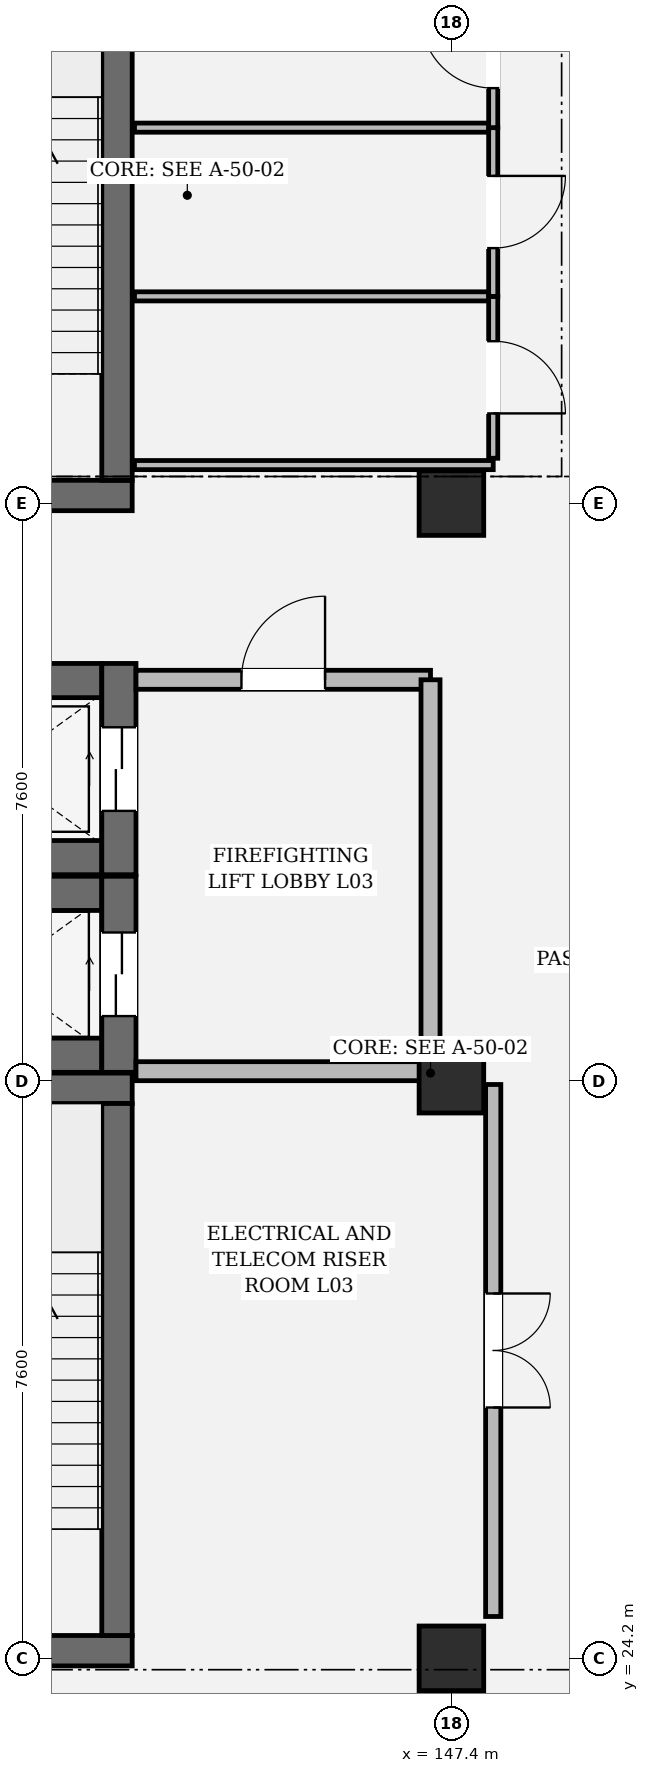
"""IFC4 building model, lengths in metres.
Left out: names, types, materials, properties, quantities, classifications, styles, units other than length and angle.
Written with IfcOpenShell. Run it as: python <this file> out.ifc"""

import sys

from ifc_helpers import new_model, si_unit, direction, frame, frame_2d, origin, origin_2d, place, context, subcontext, project, spatial, rectangle, extrude, element, fill, save


model = new_model("IFC4")
c1 = context("Model", 3, precision=1e-05, world=origin(), true_north=direction((0.0, 1.0)))
c2 = subcontext(c1, "Body", "Model", "MODEL_VIEW")
j1 = project(units=[si_unit("LENGTHUNIT", "METRE"), si_unit("PLANEANGLEUNIT", "RADIAN")], contexts=[c1])
p1 = place(None, origin())
s1 = spatial("IfcSite", under=j1, at=p1, CompositionType="ELEMENT")
p2 = place(p1, origin())
s2 = spatial("IfcBuilding", under=s1, at=p2, CompositionType="ELEMENT")
p3 = place(p2, frame((0.0, 0.0, 15.0)))
s3 = spatial("IfcBuildingStorey", under=s2, at=p3, CompositionType="ELEMENT", Elevation=15.0)
for number, where, z_axis, x_axis in (
    (1, (147.4, 24.2, 0.0), (0.0, 0.0, 1.0), (1.0, 0.0, 0.0)),
    (2, (147.4, 31.8, 0.0), (0.0, 0.0, 1.0), (1.0, 0.0, 0.0)),
    (3, (147.4, 39.4, 0.0), (0.0, 0.0, 1.0), (1.0, 0.0, 0.0)),
):
    element("IfcColumn", number, at=place(p3, frame(where, z_axis=z_axis, x_axis=x_axis)), inside=s3, PredefinedType="COLUMN", context=c2, shape_type="SweptSolid", body=[
        extrude(rectangle(XDim=0.85, YDim=0.85, at=origin_2d()), origin(), (0.0, 0.0, 1.0), 4.48),
    ])
p4 = place(p3, frame((139.4, 24.3, 0.0), z_axis=(0.0, 0.0, 1.0), x_axis=(1.0, 0.0, 0.0)))
e4 = element("IfcWall", 4, at=p4, inside=s3, PredefinedType="SHEAR", context=c2, shape_type="SweptSolid", body=[
    extrude(rectangle(XDim=3.8, YDim=0.4, at=frame_2d((1.9, 0.0))), origin(), (0.0, 0.0, 1.0), 4.48),
])
p5 = place(p4, frame((1.3, 0.0, 0.0)))
e5 = element("IfcOpeningElement", 5, at=p5, cuts=e4, PredefinedType="OPENING", context=c2, shape_type="SweptSolid", body=[
    extrude(rectangle(XDim=1.2, YDim=2.2, at=frame_2d((0.6, 1.1))), frame((0.0, 0.212, 0.0), z_axis=(0.0, -1.0, 0.0), x_axis=(1.0, 0.0, 0.0)), (0.0, 0.0, 1.0), 0.424),
])
p6 = place(p3, frame((139.4, 31.7, 0.0), z_axis=(0.0, 0.0, 1.0), x_axis=(1.0, 0.0, 0.0)))
e6 = element("IfcWall", 6, at=p6, inside=s3, PredefinedType="SHEAR", context=c2, shape_type="SweptSolid", body=[
    extrude(rectangle(XDim=3.8, YDim=0.4, at=frame_2d((1.9, 0.0))), origin(), (0.0, 0.0, 1.0), 4.48),
])
p7 = place(p3, frame((143.0, 24.5, 0.0), z_axis=(0.0, 0.0, 1.0), x_axis=(0.0, 1.0, 0.0)))
e7 = element("IfcWall", 7, at=p7, inside=s3, PredefinedType="SHEAR", context=c2, shape_type="SweptSolid", body=[
    extrude(rectangle(XDim=7.0, YDim=0.4, at=frame_2d((3.5, 0.0))), origin(), (0.0, 0.0, 1.0), 4.48),
])
p8 = place(p3, frame((139.4, 39.5, 0.0), z_axis=(0.0, 0.0, 1.0), x_axis=(1.0, 0.0, 0.0)))
e8 = element("IfcWall", 8, at=p8, inside=s3, PredefinedType="SHEAR", context=c2, shape_type="SweptSolid", body=[
    extrude(rectangle(XDim=3.8, YDim=0.4, at=frame_2d((1.9, 0.0))), origin(), (0.0, 0.0, 1.0), 4.48),
])
p9 = place(p8, frame((1.3, 0.0, 0.0)))
e9 = element("IfcOpeningElement", 9, at=p9, cuts=e8, PredefinedType="OPENING", context=c2, shape_type="SweptSolid", body=[
    extrude(rectangle(XDim=1.2, YDim=2.2, at=frame_2d((0.6, 1.1))), frame((0.0, 0.212, 0.0), z_axis=(0.0, -1.0, 0.0), x_axis=(1.0, 0.0, 0.0)), (0.0, 0.0, 1.0), 0.424),
])
p10 = place(p3, frame((143.0, 39.7, 0.0), z_axis=(0.0, 0.0, 1.0), x_axis=(0.0, 1.0, 0.0)))
e10 = element("IfcWall", 10, at=p10, inside=s3, PredefinedType="SHEAR", context=c2, shape_type="SweptSolid", body=[
    extrude(rectangle(XDim=7.0, YDim=0.4, at=frame_2d((3.5, 0.0))), origin(), (0.0, 0.0, 1.0), 4.48),
])
for number, where, z_axis, x_axis in (
    (11, (140.06, 32.135, 0.0), (0.0, 0.0, 1.0), (1.0, 0.0, 0.0)),
    (12, (140.06, 34.265, 0.0), (0.0, 0.0, 1.0), (1.0, 0.0, 0.0)),
):
    element("IfcWall", number, at=place(p3, frame(where, z_axis=z_axis, x_axis=x_axis)), inside=s3, PredefinedType="SHEAR", context=c2, shape_type="SweptSolid", body=[
        extrude(rectangle(XDim=2.74, YDim=0.45, at=frame_2d((1.37, 0.0))), origin(), (0.0, 0.0, 1.0), 4.48),
    ])
p11 = place(p3, frame((143.025, 31.91, 0.0), z_axis=(0.0, 0.0, 1.0), x_axis=(0.0, 1.0, 0.0)))
e13 = element("IfcWall", 13, at=p11, inside=s3, PredefinedType="SHEAR", context=c2, shape_type="SweptSolid", body=[
    extrude(rectangle(XDim=2.58, YDim=0.45, at=frame_2d((1.29, 0.0))), origin(), (0.0, 0.0, 1.0), 4.48),
])
p12 = place(p11, frame((0.74, 0.0, 0.0)))
e14 = element("IfcOpeningElement", 14, at=p12, cuts=e13, PredefinedType="OPENING", context=c2, shape_type="SweptSolid", body=[
    extrude(rectangle(XDim=1.1, YDim=2.2, at=frame_2d((0.55, 1.1))), frame((0.0, 0.237, 0.0), z_axis=(0.0, -1.0, 0.0), x_axis=(1.0, 0.0, 0.0)), (0.0, 0.0, 1.0), 0.474),
])
for number, where, z_axis, x_axis in (
    (15, (140.06, 34.735, 0.0), (0.0, 0.0, 1.0), (1.0, 0.0, 0.0)),
    (16, (140.06, 37.065, 0.0), (0.0, 0.0, 1.0), (1.0, 0.0, 0.0)),
):
    element("IfcWall", number, at=place(p3, frame(where, z_axis=z_axis, x_axis=x_axis)), inside=s3, PredefinedType="SHEAR", context=c2, shape_type="SweptSolid", body=[
        extrude(rectangle(XDim=2.74, YDim=0.45, at=frame_2d((1.37, 0.0))), origin(), (0.0, 0.0, 1.0), 4.48),
    ])
p13 = place(p3, frame((143.025, 34.51, 0.0), z_axis=(0.0, 0.0, 1.0), x_axis=(0.0, 1.0, 0.0)))
e17 = element("IfcWall", 17, at=p13, inside=s3, PredefinedType="SHEAR", context=c2, shape_type="SweptSolid", body=[
    extrude(rectangle(XDim=2.78, YDim=0.45, at=frame_2d((1.39, 0.0))), origin(), (0.0, 0.0, 1.0), 4.48),
])
p14 = place(p13, frame((0.84, 0.0, 0.0)))
e18 = element("IfcOpeningElement", 18, at=p14, cuts=e17, PredefinedType="OPENING", context=c2, shape_type="SweptSolid", body=[
    extrude(rectangle(XDim=1.1, YDim=2.2, at=frame_2d((0.55, 1.1))), frame((0.0, 0.237, 0.0), z_axis=(0.0, -1.0, 0.0), x_axis=(1.0, 0.0, 0.0)), (0.0, 0.0, 1.0), 0.474),
])
p15 = place(p3, frame((143.25, 37.075, 0.0), z_axis=(0.0, 0.0, 1.0), x_axis=(1.0, 0.0, 0.0)))
e19 = element("IfcWall", 19, at=p15, inside=s3, PredefinedType="SOLIDWALL", context=c2, shape_type="SweptSolid", body=[
    extrude(rectangle(XDim=3.875, YDim=0.25, at=frame_2d((1.938, 0.0))), origin(), (0.0, 0.0, 1.0), 4.405),
])
p16 = place(p15, frame((1.387, 0.0, 0.0)))
e20 = element("IfcOpeningElement", 20, at=p16, cuts=e19, PredefinedType="OPENING", context=c2, shape_type="SweptSolid", body=[
    extrude(rectangle(XDim=1.1, YDim=2.2, at=frame_2d((0.55, 1.1))), frame((0.0, 0.137, 0.0), z_axis=(0.0, -1.0, 0.0), x_axis=(1.0, 0.0, 0.0)), (0.0, 0.0, 1.0), 0.274),
])
p17 = place(p3, frame((143.25, 31.925, 0.0), z_axis=(0.0, 0.0, 1.0), x_axis=(1.0, 0.0, 0.0)))
e21 = element("IfcWall", 21, at=p17, inside=s3, PredefinedType="SOLIDWALL", context=c2, shape_type="SweptSolid", body=[
    extrude(rectangle(XDim=3.875, YDim=0.25, at=frame_2d((1.938, 0.0))), origin(), (0.0, 0.0, 1.0), 3.765),
])
p18 = place(p3, frame((147.125, 31.925, 0.0), z_axis=(0.0, 0.0, 1.0), x_axis=(0.0, 1.0, 0.0)))
e22 = element("IfcWall", 22, at=p18, inside=s3, PredefinedType="SOLIDWALL", context=c2, shape_type="SweptSolid", body=[
    extrude(rectangle(XDim=5.15, YDim=0.25, at=frame_2d((2.575, 0.0))), origin(), (0.0, 0.0, 1.0), 3.765),
])
p19 = place(p3, frame((143.23, 39.9, 0.0), z_axis=(0.0, 0.0, 1.0), x_axis=(1.0, 0.0, 0.0)))
e23 = element("IfcWall", 23, at=p19, inside=s3, PredefinedType="PARTITIONING", context=c2, shape_type="SweptSolid", body=[
    extrude(rectangle(XDim=4.72, YDim=0.12, at=frame_2d((2.36, 0.0))), origin(), (0.0, 0.0, 1.0), 4.405),
])
p20 = place(p3, frame((147.95, 31.75, 0.0), z_axis=(0.0, 0.0, 1.0), x_axis=(0.0, -1.0, 0.0)))
e24 = element("IfcWall", 24, at=p20, inside=s3, PredefinedType="PARTITIONING", context=c2, shape_type="SweptSolid", body=[
    extrude(rectangle(XDim=7.0, YDim=0.2, at=frame_2d((3.5, 0.0))), origin(), (0.0, 0.0, 1.0), 4.405),
])
p21 = place(p20, frame((2.75, 0.0, 0.0)))
e25 = element("IfcOpeningElement", 25, at=p21, cuts=e24, PredefinedType="OPENING", context=c2, shape_type="SweptSolid", body=[
    extrude(rectangle(XDim=1.5, YDim=2.2, at=frame_2d((0.75, 1.1))), frame((0.0, 0.112, 0.0), z_axis=(0.0, -1.0, 0.0), x_axis=(1.0, 0.0, 0.0)), (0.0, 0.0, 1.0), 0.224),
])
p22 = place(p3, frame((143.23, 42.12, 0.0), z_axis=(0.0, 0.0, 1.0), x_axis=(1.0, 0.0, 0.0)))
e26 = element("IfcWall", 26, at=p22, inside=s3, PredefinedType="PARTITIONING", context=c2, shape_type="SweptSolid", body=[
    extrude(rectangle(XDim=4.72, YDim=0.12, at=frame_2d((2.36, 0.0))), origin(), (0.0, 0.0, 1.0), 3.955),
])
p23 = place(p3, frame((147.95, 42.12, 0.0), z_axis=(0.0, 0.0, 1.0), x_axis=(0.0, -1.0, 0.0)))
e27 = element("IfcWall", 27, at=p23, inside=s3, PredefinedType="PARTITIONING", context=c2, shape_type="SweptSolid", body=[
    extrude(rectangle(XDim=2.13, YDim=0.12, at=frame_2d((1.065, 0.0))), origin(), (0.0, 0.0, 1.0), 4.405),
])
p24 = place(p23, frame((0.59, 0.0, 0.0)))
e28 = element("IfcOpeningElement", 28, at=p24, cuts=e27, PredefinedType="OPENING", context=c2, shape_type="SweptSolid", body=[
    extrude(rectangle(XDim=0.95, YDim=2.15, at=frame_2d((0.475, 1.075))), frame((0.0, 0.072, 0.0), z_axis=(0.0, -1.0, 0.0), x_axis=(1.0, 0.0, 0.0)), (0.0, 0.0, 1.0), 0.144),
])
p25 = place(p3, frame((143.23, 44.34, 0.0), z_axis=(0.0, 0.0, 1.0), x_axis=(1.0, 0.0, 0.0)))
e29 = element("IfcWall", 29, at=p25, inside=s3, PredefinedType="PARTITIONING", context=c2, shape_type="SweptSolid", body=[
    extrude(rectangle(XDim=4.72, YDim=0.12, at=frame_2d((2.36, 0.0))), origin(), (0.0, 0.0, 1.0), 3.905),
])
p26 = place(p3, frame((147.95, 44.34, 0.0), z_axis=(0.0, 0.0, 1.0), x_axis=(0.0, -1.0, 0.0)))
e30 = element("IfcWall", 30, at=p26, inside=s3, PredefinedType="PARTITIONING", context=c2, shape_type="SweptSolid", body=[
    extrude(rectangle(XDim=2.22, YDim=0.12, at=frame_2d((1.11, 0.0))), origin(), (0.0, 0.0, 1.0), 4.405),
])
p27 = place(p26, frame((0.635, 0.0, 0.0)))
e31 = element("IfcOpeningElement", 31, at=p27, cuts=e30, PredefinedType="OPENING", context=c2, shape_type="SweptSolid", body=[
    extrude(rectangle(XDim=0.95, YDim=2.15, at=frame_2d((0.475, 1.075))), frame((0.0, 0.072, 0.0), z_axis=(0.0, -1.0, 0.0), x_axis=(1.0, 0.0, 0.0)), (0.0, 0.0, 1.0), 0.144),
])
p28 = place(p3, frame((147.95, 46.33, 0.0), z_axis=(0.0, 0.0, 1.0), x_axis=(0.0, -1.0, 0.0)))
e32 = element("IfcWall", 32, at=p28, inside=s3, PredefinedType="PARTITIONING", context=c2, shape_type="SweptSolid", body=[
    extrude(rectangle(XDim=1.99, YDim=0.12, at=frame_2d((0.995, 0.0))), origin(), (0.0, 0.0, 1.0), 4.405),
])
p29 = place(p28, frame((0.52, 0.0, 0.0)))
e33 = element("IfcOpeningElement", 33, at=p29, cuts=e32, PredefinedType="OPENING", context=c2, shape_type="SweptSolid", body=[
    extrude(rectangle(XDim=0.95, YDim=2.15, at=frame_2d((0.475, 1.075))), frame((0.0, 0.072, 0.0), z_axis=(0.0, -1.0, 0.0), x_axis=(1.0, 0.0, 0.0)), (0.0, 0.0, 1.0), 0.144),
])
p30 = place(p12, origin())
e34 = element("IfcDoor", 34, at=p30, inside=s3, OperationType="DOUBLE_DOOR_SLIDING", PredefinedType="DOOR", context=c2, shape_type="SweptSolid", body=[
    extrude(rectangle(XDim=1.1, YDim=2.2, at=frame_2d((0.55, 1.1))), frame((0.0, 0.025, 0.0), z_axis=(0.0, -1.0, 0.0), x_axis=(1.0, 0.0, 0.0)), (0.0, 0.0, 1.0), 0.05),
])
fill(e14, e34)
p31 = place(p14, origin())
e35 = element("IfcDoor", 35, at=p31, inside=s3, OperationType="DOUBLE_DOOR_SLIDING", PredefinedType="DOOR", context=c2, shape_type="SweptSolid", body=[
    extrude(rectangle(XDim=1.1, YDim=2.2, at=frame_2d((0.55, 1.1))), frame((0.0, 0.025, 0.0), z_axis=(0.0, -1.0, 0.0), x_axis=(1.0, 0.0, 0.0)), (0.0, 0.0, 1.0), 0.05),
])
fill(e18, e35)
p32 = place(p16, origin())
e36 = element("IfcDoor", 36, at=p32, inside=s3, OperationType="SINGLE_SWING_RIGHT", PredefinedType="DOOR", context=c2, shape_type="SweptSolid", body=[
    extrude(rectangle(XDim=1.1, YDim=2.2, at=frame_2d((0.55, 1.1))), frame((0.0, 0.025, 0.0), z_axis=(0.0, -1.0, 0.0), x_axis=(1.0, 0.0, 0.0)), (0.0, 0.0, 1.0), 0.05),
])
fill(e20, e36)
p33 = place(p21, origin())
e37 = element("IfcDoor", 37, at=p33, inside=s3, OperationType="DOUBLE_DOOR_SINGLE_SWING", PredefinedType="DOOR", context=c2, shape_type="SweptSolid", body=[
    extrude(rectangle(XDim=1.5, YDim=2.2, at=frame_2d((0.75, 1.1))), frame((0.0, 0.025, 0.0), z_axis=(0.0, -1.0, 0.0), x_axis=(1.0, 0.0, 0.0)), (0.0, 0.0, 1.0), 0.05),
])
fill(e25, e37)
p34 = place(p24, origin())
e38 = element("IfcDoor", 38, at=p34, inside=s3, OperationType="SINGLE_SWING_RIGHT", PredefinedType="DOOR", context=c2, shape_type="SweptSolid", body=[
    extrude(rectangle(XDim=0.95, YDim=2.15, at=frame_2d((0.475, 1.075))), frame((0.0, 0.025, 0.0), z_axis=(0.0, -1.0, 0.0), x_axis=(1.0, 0.0, 0.0)), (0.0, 0.0, 1.0), 0.05),
])
fill(e28, e38)
p35 = place(p27, origin())
e39 = element("IfcDoor", 39, at=p35, inside=s3, OperationType="SINGLE_SWING_LEFT", PredefinedType="DOOR", context=c2, shape_type="SweptSolid", body=[
    extrude(rectangle(XDim=0.95, YDim=2.15, at=frame_2d((0.475, 1.075))), frame((0.0, 0.025, 0.0), z_axis=(0.0, -1.0, 0.0), x_axis=(1.0, 0.0, 0.0)), (0.0, 0.0, 1.0), 0.05),
])
fill(e31, e39)
p36 = place(p29, frame((0.95, 0.0, 0.0), z_axis=(0.0, 0.0, 1.0), x_axis=(-1.0, 0.0, 0.0)))
e40 = element("IfcDoor", 40, at=p36, inside=s3, OperationType="SINGLE_SWING_RIGHT", PredefinedType="DOOR", context=c2, shape_type="SweptSolid", body=[
    extrude(rectangle(XDim=0.95, YDim=2.15, at=frame_2d((0.475, 1.075))), frame((0.0, 0.025, 0.0), z_axis=(0.0, -1.0, 0.0), x_axis=(1.0, 0.0, 0.0)), (0.0, 0.0, 1.0), 0.05),
])
fill(e33, e40)
save(model, sys.argv[1])
